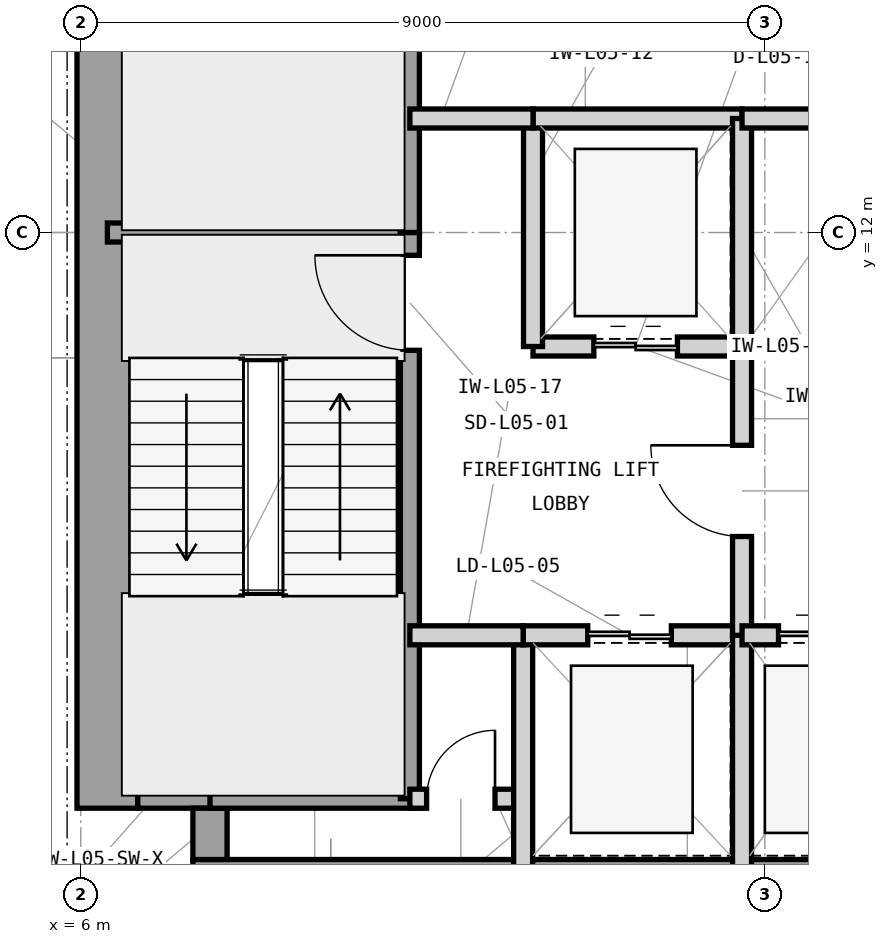
"""IFC4 building model, lengths in metres.
Left out: names, types, materials, properties, quantities, classifications, styles, units other than length and angle.
Written with IfcOpenShell. Run it as: python <this file> out.ifc"""

import sys

from ifc_helpers import new_model, si_unit, direction, frame, frame_2d, origin, place, context, subcontext, project, spatial, rectangle, extrude, element, fill, save


model = new_model("IFC4")
c1 = context("Model", 3, precision=1e-05, world=origin(), true_north=direction((0.0, 1.0)))
c2 = subcontext(c1, "Body", "Model", "MODEL_VIEW")
j1 = project(units=[si_unit("LENGTHUNIT", "METRE"), si_unit("PLANEANGLEUNIT", "RADIAN")], contexts=[c1])
p1 = place(None, origin())
s1 = spatial("IfcSite", under=j1, at=p1, CompositionType="ELEMENT")
p2 = place(p1, origin())
s2 = spatial("IfcBuilding", under=s1, at=p2, CompositionType="ELEMENT")
p3 = place(p2, frame((0.0, 0.0, 25.8)))
s3 = spatial("IfcBuildingStorey", under=s2, at=p3, CompositionType="ELEMENT", Elevation=25.8)
p4 = place(p3, frame((7.475, 3.35, 0.0), z_axis=(0.0, 0.0, 1.0), x_axis=(1.0, 0.0, 0.0)))
e1 = element("IfcWall", 1, at=p4, inside=s3, PredefinedType="SHEAR", context=c2, shape_type="SweptSolid", body=[
    extrude(rectangle(XDim=16.575, YDim=0.8, at=frame_2d((8.288, 0.0))), origin(), (0.0, 0.0, 1.0), 4.2),
])
p5 = place(p3, frame((6.35, 4.425, 0.0), z_axis=(0.0, 0.0, 1.0), x_axis=(0.0, 1.0, 0.0)))
e2 = element("IfcWall", 2, at=p5, inside=s3, PredefinedType="SHEAR", context=c2, shape_type="SweptSolid", body=[
    extrude(rectangle(XDim=15.15, YDim=0.8, at=frame_2d((7.575, 0.0))), origin(), (0.0, 0.0, 1.0), 4.2),
])
p6 = place(p3, frame((6.75, 4.65, 0.0), z_axis=(0.0, 0.0, 1.0), x_axis=(1.0, 0.0, 0.0)))
e3 = element("IfcWall", 3, at=p6, inside=s3, PredefinedType="SHEAR", context=c2, shape_type="SweptSolid", body=[
    extrude(rectangle(XDim=1.175, YDim=0.45, at=frame_2d((0.587, 0.0))), origin(), (0.0, 0.0, 1.0), 4.2),
])
p7 = place(p3, frame((7.7, 3.75, 0.0), z_axis=(0.0, 0.0, 1.0), x_axis=(0.0, 1.0, 0.0)))
e4 = element("IfcWall", 4, at=p7, inside=s3, PredefinedType="SHEAR", context=c2, shape_type="SweptSolid", body=[
    extrude(rectangle(XDim=0.675, YDim=0.45, at=frame_2d((0.337, 0.0))), origin(), (0.0, 0.0, 1.0), 4.2),
])
p8 = place(p3, frame((6.35, 12.0, 0.0), z_axis=(0.0, 0.0, 1.0), x_axis=(1.0, 0.0, 0.0)))
e5 = element("IfcWall", 5, at=p8, inside=s3, PredefinedType="SHEAR", context=c2, shape_type="SweptSolid", body=[
    extrude(rectangle(XDim=4.105, YDim=0.25, at=frame_2d((2.052, 0.0))), origin(), (0.0, 0.0, 1.0), 4.2),
])
p9 = place(p3, frame((7.7, 4.55, 0.0), z_axis=(0.0, 0.0, 1.0), x_axis=(1.0, 0.0, 0.0)))
e6 = element("IfcWall", 6, at=p9, inside=s3, PredefinedType="SHEAR", context=c2, shape_type="SweptSolid", body=[
    extrude(rectangle(XDim=2.755, YDim=0.25, at=frame_2d((1.377, 0.0))), origin(), (0.0, 0.0, 1.0), 4.2),
])
p10 = place(p3, frame((10.33, 4.55, 0.0), z_axis=(0.0, 0.0, 1.0), x_axis=(0.0, 1.0, 0.0)))
e7 = element("IfcWall", 7, at=p10, inside=s3, PredefinedType="SHEAR", context=c2, shape_type="SweptSolid", body=[
    extrude(rectangle(XDim=7.45, YDim=0.25, at=frame_2d((3.725, 0.0))), origin(), (0.0, 0.0, 1.0), 4.2),
])
p11 = place(p10, frame((5.9, 0.0, 0.0)))
e8 = element("IfcOpeningElement", 8, at=p11, cuts=e7, PredefinedType="OPENING", context=c2, shape_type="SweptSolid", body=[
    extrude(rectangle(XDim=1.25, YDim=2.2, at=frame_2d((0.625, 1.1))), frame((0.0, 0.135, 0.0), z_axis=(0.0, -1.0, 0.0), x_axis=(1.0, 0.0, 0.0)), (0.0, 0.0, 1.0), 0.27),
])
p12 = place(p3, frame((10.33, 12.0, 0.0), z_axis=(0.0, 0.0, 1.0), x_axis=(0.0, 1.0, 0.0)))
e9 = element("IfcWall", 9, at=p12, inside=s3, PredefinedType="SHEAR", context=c2, shape_type="SweptSolid", body=[
    extrude(rectangle(XDim=7.45, YDim=0.25, at=frame_2d((3.725, 0.0))), origin(), (0.0, 0.0, 1.0), 4.2),
])
p13 = place(p12, frame((5.85, 0.0, 0.0)))
e10 = element("IfcOpeningElement", 10, at=p13, cuts=e9, PredefinedType="OPENING", context=c2, shape_type="SweptSolid", body=[
    extrude(rectangle(XDim=1.25, YDim=2.2, at=frame_2d((0.625, 1.1))), frame((0.0, 0.135, 0.0), z_axis=(0.0, -1.0, 0.0), x_axis=(1.0, 0.0, 0.0)), (0.0, 0.0, 1.0), 0.27),
])
p14 = place(p3, frame((10.33, 4.55, 0.0), z_axis=(0.0, 0.0, 1.0), x_axis=(1.0, 0.0, 0.0)))
e11 = element("IfcWall", 11, at=p14, inside=s3, PredefinedType="PARTITIONING", context=c2, shape_type="SweptSolid", body=[
    extrude(rectangle(XDim=1.49, YDim=0.25, at=frame_2d((0.745, 0.0))), origin(), (0.0, 0.0, 1.0), 3.97),
])
p15 = place(p14, frame((0.22, 0.0, 0.0)))
e12 = element("IfcOpeningElement", 12, at=p15, cuts=e11, PredefinedType="OPENING", context=c2, shape_type="SweptSolid", body=[
    extrude(rectangle(XDim=0.9, YDim=2.1, at=frame_2d((0.45, 1.05))), frame((0.0, 0.135, 0.0), z_axis=(0.0, -1.0, 0.0), x_axis=(1.0, 0.0, 0.0)), (0.0, 0.0, 1.0), 0.27),
])
p16 = place(p3, frame((11.82, 3.35, 0.0), z_axis=(0.0, 0.0, 1.0), x_axis=(0.0, 1.0, 0.0)))
e13 = element("IfcWall", 13, at=p16, inside=s3, PredefinedType="PARTITIONING", context=c2, shape_type="SweptSolid", body=[
    extrude(rectangle(XDim=3.35, YDim=0.25, at=frame_2d((1.675, 0.0))), origin(), (0.0, 0.0, 1.0), 3.97),
])
p17 = place(p3, frame((11.82, 6.7, 0.0), z_axis=(0.0, 0.0, 1.0), x_axis=(1.0, 0.0, 0.0)))
e14 = element("IfcWall", 14, at=p17, inside=s3, PredefinedType="PARTITIONING", context=c2, shape_type="SweptSolid", body=[
    extrude(rectangle(XDim=2.88, YDim=0.25, at=frame_2d((1.44, 0.0))), origin(), (0.0, 0.0, 1.0), 3.426),
])
p18 = place(p17, frame((0.85, 0.0, 0.0)))
e15 = element("IfcOpeningElement", 15, at=p18, cuts=e14, PredefinedType="OPENING", context=c2, shape_type="SweptSolid", body=[
    extrude(rectangle(XDim=1.1, YDim=2.25, at=frame_2d((0.55, 1.125))), frame((0.0, 0.135, 0.0), z_axis=(0.0, -1.0, 0.0), x_axis=(1.0, 0.0, 0.0)), (0.0, 0.0, 1.0), 0.27),
])
p19 = place(p3, frame((14.7, 3.35, 0.0), z_axis=(0.0, 0.0, 1.0), x_axis=(0.0, 1.0, 0.0)))
e16 = element("IfcWall", 16, at=p19, inside=s3, PredefinedType="PARTITIONING", context=c2, shape_type="SweptSolid", body=[
    extrude(rectangle(XDim=3.35, YDim=0.25, at=frame_2d((1.675, 0.0))), origin(), (0.0, 0.0, 1.0), 3.97),
])
p20 = place(p3, frame((11.95, 10.5, 0.0), z_axis=(0.0, 0.0, 1.0), x_axis=(1.0, 0.0, 0.0)))
e17 = element("IfcWall", 17, at=p20, inside=s3, PredefinedType="PARTITIONING", context=c2, shape_type="SweptSolid", body=[
    extrude(rectangle(XDim=2.75, YDim=0.25, at=frame_2d((1.375, 0.0))), origin(), (0.0, 0.0, 1.0), 3.426),
])
p21 = place(p20, frame((0.8, 0.0, 0.0)))
e18 = element("IfcOpeningElement", 18, at=p21, cuts=e17, PredefinedType="OPENING", context=c2, shape_type="SweptSolid", body=[
    extrude(rectangle(XDim=1.1, YDim=2.25, at=frame_2d((0.55, 1.125))), frame((0.0, 0.135, 0.0), z_axis=(0.0, -1.0, 0.0), x_axis=(1.0, 0.0, 0.0)), (0.0, 0.0, 1.0), 0.27),
])
p22 = place(p3, frame((11.95, 10.5, 0.0), z_axis=(0.0, 0.0, 1.0), x_axis=(0.0, 1.0, 0.0)))
e19 = element("IfcWall", 19, at=p22, inside=s3, PredefinedType="PARTITIONING", context=c2, shape_type="SweptSolid", body=[
    extrude(rectangle(XDim=3.0, YDim=0.25, at=frame_2d((1.5, 0.0))), origin(), (0.0, 0.0, 1.0), 3.97),
])
p23 = place(p3, frame((11.95, 13.5, 0.0), z_axis=(0.0, 0.0, 1.0), x_axis=(1.0, 0.0, 0.0)))
e20 = element("IfcWall", 20, at=p23, inside=s3, PredefinedType="PARTITIONING", context=c2, shape_type="SweptSolid", body=[
    extrude(rectangle(XDim=2.75, YDim=0.25, at=frame_2d((1.375, 0.0))), origin(), (0.0, 0.0, 1.0), 3.426),
])
p24 = place(p3, frame((14.7, 10.5, 0.0), z_axis=(0.0, 0.0, 1.0), x_axis=(0.0, 1.0, 0.0)))
e21 = element("IfcWall", 21, at=p24, inside=s3, PredefinedType="PARTITIONING", context=c2, shape_type="SweptSolid", body=[
    extrude(rectangle(XDim=3.0, YDim=0.25, at=frame_2d((1.5, 0.0))), origin(), (0.0, 0.0, 1.0), 3.97),
])
p25 = place(p3, frame((14.7, 6.7, 0.0), z_axis=(0.0, 0.0, 1.0), x_axis=(0.0, 1.0, 0.0)))
e22 = element("IfcWall", 22, at=p25, inside=s3, PredefinedType="PARTITIONING", context=c2, shape_type="SweptSolid", body=[
    extrude(rectangle(XDim=3.8, YDim=0.25, at=frame_2d((1.9, 0.0))), origin(), (0.0, 0.0, 1.0), 3.97),
])
p26 = place(p25, frame((1.3, 0.0, 0.0)))
e23 = element("IfcOpeningElement", 23, at=p26, cuts=e22, PredefinedType="OPENING", context=c2, shape_type="SweptSolid", body=[
    extrude(rectangle(XDim=1.2, YDim=2.2, at=frame_2d((0.6, 1.1))), frame((0.0, 0.135, 0.0), z_axis=(0.0, -1.0, 0.0), x_axis=(1.0, 0.0, 0.0)), (0.0, 0.0, 1.0), 0.27),
])
p27 = place(p3, frame((10.33, 13.5, 0.0), z_axis=(0.0, 0.0, 1.0), x_axis=(1.0, 0.0, 0.0)))
e24 = element("IfcWall", 24, at=p27, inside=s3, PredefinedType="PARTITIONING", context=c2, shape_type="SweptSolid", body=[
    extrude(rectangle(XDim=1.62, YDim=0.25, at=frame_2d((0.81, 0.0))), origin(), (0.0, 0.0, 1.0), 3.426),
])
p28 = place(p3, frame((10.33, 6.7, 0.0), z_axis=(0.0, 0.0, 1.0), x_axis=(1.0, 0.0, 0.0)))
e25 = element("IfcWall", 25, at=p28, inside=s3, PredefinedType="PARTITIONING", context=c2, shape_type="SweptSolid", body=[
    extrude(rectangle(XDim=1.49, YDim=0.25, at=frame_2d((0.745, 0.0))), origin(), (0.0, 0.0, 1.0), 3.426),
])
p29 = place(p3, frame((14.7, 6.7, 0.0), z_axis=(0.0, 0.0, 1.0), x_axis=(1.0, 0.0, 0.0)))
e26 = element("IfcWall", 26, at=p29, inside=s3, PredefinedType="PARTITIONING", context=c2, shape_type="SweptSolid", body=[
    extrude(rectangle(XDim=2.15, YDim=0.25, at=frame_2d((1.075, 0.0))), origin(), (0.0, 0.0, 1.0), 3.426),
])
p30 = place(p29, frame((0.48, 0.0, 0.0)))
e27 = element("IfcOpeningElement", 27, at=p30, cuts=e26, PredefinedType="OPENING", context=c2, shape_type="SweptSolid", body=[
    extrude(rectangle(XDim=1.15, YDim=2.25, at=frame_2d((0.575, 1.125))), frame((0.0, 0.135, 0.0), z_axis=(0.0, -1.0, 0.0), x_axis=(1.0, 0.0, 0.0)), (0.0, 0.0, 1.0), 0.27),
])
p31 = place(p3, frame((14.7, 10.5, 0.0), z_axis=(0.0, 0.0, 1.0), x_axis=(1.0, 0.0, 0.0)))
e28 = element("IfcWall", 28, at=p31, inside=s3, PredefinedType="PARTITIONING", context=c2, shape_type="SweptSolid", body=[
    extrude(rectangle(XDim=2.15, YDim=0.25, at=frame_2d((1.075, 0.0))), origin(), (0.0, 0.0, 1.0), 3.426),
])
p32 = place(p3, frame((14.7, 13.5, 0.0), z_axis=(0.0, 0.0, 1.0), x_axis=(1.0, 0.0, 0.0)))
e29 = element("IfcWall", 29, at=p32, inside=s3, PredefinedType="PARTITIONING", context=c2, shape_type="SweptSolid", body=[
    extrude(rectangle(XDim=8.95, YDim=0.25, at=frame_2d((4.475, 0.0))), origin(), (0.0, 0.0, 1.0), 3.426),
])
p33 = place(p11, origin())
e30 = element("IfcDoor", 30, at=p33, inside=s3, OperationType="SINGLE_SWING_RIGHT", PredefinedType="DOOR", context=c2, shape_type="SweptSolid", body=[
    extrude(rectangle(XDim=1.25, YDim=2.2, at=frame_2d((0.625, 1.1))), frame((0.0, 0.025, 0.0), z_axis=(0.0, -1.0, 0.0), x_axis=(1.0, 0.0, 0.0)), (0.0, 0.0, 1.0), 0.05),
])
fill(e8, e30)
p34 = place(p15, origin())
e31 = element("IfcDoor", 31, at=p34, inside=s3, OperationType="SINGLE_SWING_RIGHT", PredefinedType="TRAPDOOR", context=c2, shape_type="SweptSolid", body=[
    extrude(rectangle(XDim=0.9, YDim=2.1, at=frame_2d((0.45, 1.05))), frame((0.0, 0.025, 0.0), z_axis=(0.0, -1.0, 0.0), x_axis=(1.0, 0.0, 0.0)), (0.0, 0.0, 1.0), 0.05),
])
fill(e12, e31)
p35 = place(p18, origin())
e32 = element("IfcDoor", 32, at=p35, inside=s3, OperationType="DOUBLE_DOOR_SLIDING", PredefinedType="DOOR", context=c2, shape_type="SweptSolid", body=[
    extrude(rectangle(XDim=1.1, YDim=2.25, at=frame_2d((0.55, 1.125))), frame((0.0, 0.025, 0.0), z_axis=(0.0, -1.0, 0.0), x_axis=(1.0, 0.0, 0.0)), (0.0, 0.0, 1.0), 0.05),
])
fill(e15, e32)
p36 = place(p21, origin())
e33 = element("IfcDoor", 33, at=p36, inside=s3, OperationType="DOUBLE_DOOR_SLIDING", PredefinedType="DOOR", context=c2, shape_type="SweptSolid", body=[
    extrude(rectangle(XDim=1.1, YDim=2.25, at=frame_2d((0.55, 1.125))), frame((0.0, 0.025, 0.0), z_axis=(0.0, -1.0, 0.0), x_axis=(1.0, 0.0, 0.0)), (0.0, 0.0, 1.0), 0.05),
])
fill(e18, e33)
p37 = place(p26, origin())
e34 = element("IfcDoor", 34, at=p37, inside=s3, OperationType="SINGLE_SWING_RIGHT", PredefinedType="DOOR", context=c2, shape_type="SweptSolid", body=[
    extrude(rectangle(XDim=1.2, YDim=2.2, at=frame_2d((0.6, 1.1))), frame((0.0, 0.025, 0.0), z_axis=(0.0, -1.0, 0.0), x_axis=(1.0, 0.0, 0.0)), (0.0, 0.0, 1.0), 0.05),
])
fill(e23, e34)
p38 = place(p30, origin())
e35 = element("IfcDoor", 35, at=p38, inside=s3, OperationType="DOUBLE_DOOR_SLIDING", PredefinedType="DOOR", context=c2, shape_type="SweptSolid", body=[
    extrude(rectangle(XDim=1.15, YDim=2.25, at=frame_2d((0.575, 1.125))), frame((0.0, 0.025, 0.0), z_axis=(0.0, -1.0, 0.0), x_axis=(1.0, 0.0, 0.0)), (0.0, 0.0, 1.0), 0.05),
])
fill(e27, e35)
save(model, sys.argv[1])
